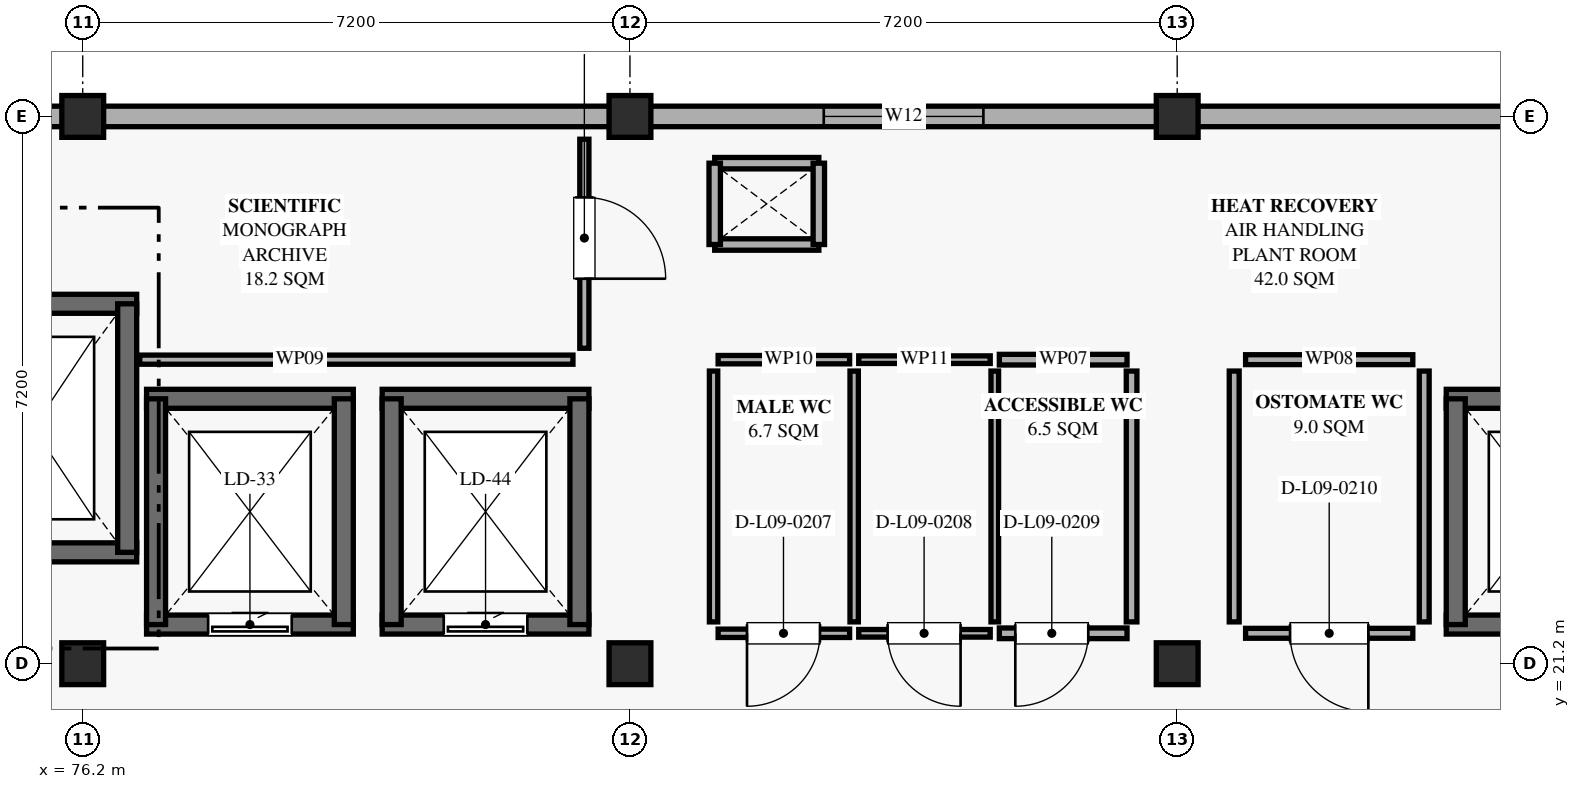
"""IFC4 building model, lengths in metres.
Left out: names, types, materials, properties, quantities, classifications, styles, units other than length and angle.
Written with IfcOpenShell. Run it as: python <this file> out.ifc"""

import sys

from ifc_helpers import new_model, si_unit, direction, frame, frame_2d, origin, origin_2d, place, context, subcontext, project, spatial, rectangle, extrude, element, fill, save


model = new_model("IFC4")
c1 = context("Model", 3, precision=1e-05, world=origin(), true_north=direction((0.0, 1.0)))
c2 = subcontext(c1, "Body", "Model", "MODEL_VIEW")
j1 = project(units=[si_unit("LENGTHUNIT", "METRE"), si_unit("PLANEANGLEUNIT", "RADIAN")], contexts=[c1])
p1 = place(None, origin())
s1 = spatial("IfcSite", under=j1, at=p1, CompositionType="ELEMENT")
p2 = place(p1, origin())
s2 = spatial("IfcBuilding", under=s1, at=p2, CompositionType="ELEMENT")
p3 = place(p2, frame((0.0, 0.0, 41.94)))
s3 = spatial("IfcBuildingStorey", under=s2, at=p3, CompositionType="ELEMENT", Elevation=41.94)
for number, where, z_axis, x_axis in (
    (1, (76.2, 21.2, 0.0), (0.0, 0.0, 1.0), (1.0, 0.0, 0.0)),
    (2, (83.4, 21.2, 0.0), (0.0, 0.0, 1.0), (1.0, 0.0, 0.0)),
    (3, (90.6, 21.2, 0.0), (0.0, 0.0, 1.0), (1.0, 0.0, 0.0)),
    (4, (76.2, 28.4, 0.0), (0.0, 0.0, 1.0), (1.0, 0.0, 0.0)),
    (5, (83.4, 28.4, 0.0), (0.0, 0.0, 1.0), (1.0, 0.0, 0.0)),
    (6, (90.6, 28.4, 0.0), (0.0, 0.0, 1.0), (1.0, 0.0, 0.0)),
):
    element("IfcColumn", number, at=place(p3, frame(where, z_axis=z_axis, x_axis=x_axis)), inside=s3, PredefinedType="COLUMN", context=c2, shape_type="SweptSolid", body=[
        extrude(rectangle(XDim=0.55, YDim=0.55, at=origin_2d()), origin(), (0.0, 0.0, 1.0), 4.32),
    ])
for number, where, z_axis, x_axis in (
    (7, (69.26, 28.4, 0.0), (0.0, 0.0, 1.0), (1.0, 0.0, 0.0)),
    (8, (76.46, 28.4, 0.0), (0.0, 0.0, 1.0), (1.0, 0.0, 0.0)),
):
    element("IfcWall", number, at=place(p3, frame(where, z_axis=z_axis, x_axis=x_axis)), inside=s3, PredefinedType="SOLIDWALL", context=c2, shape_type="SweptSolid", body=[
        extrude(rectangle(XDim=6.68, YDim=0.27, at=frame_2d((3.34, 0.0))), origin(), (0.0, 0.0, 1.0), 2.82),
    ])
p4 = place(p3, frame((83.66, 28.4, 0.0), z_axis=(0.0, 0.0, 1.0), x_axis=(1.0, 0.0, 0.0)))
e9 = element("IfcWall", 9, at=p4, inside=s3, PredefinedType="SOLIDWALL", context=c2, shape_type="SweptSolid", body=[
    extrude(rectangle(XDim=6.68, YDim=0.27, at=frame_2d((3.34, 0.0))), origin(), (0.0, 0.0, 1.0), 2.82),
])
p5 = place(p4, frame((2.29, 0.0, 0.85)))
e10 = element("IfcOpeningElement", 10, at=p5, cuts=e9, PredefinedType="OPENING", context=c2, shape_type="SweptSolid", body=[
    extrude(rectangle(XDim=2.1, YDim=1.8, at=frame_2d((1.05, 0.9))), frame((0.0, 0.145, 0.0), z_axis=(0.0, -1.0, 0.0), x_axis=(1.0, 0.0, 0.0)), (0.0, 0.0, 1.0), 0.29),
])
p6 = place(p3, frame((90.86, 28.4, 0.0), z_axis=(0.0, 0.0, 1.0), x_axis=(1.0, 0.0, 0.0)))
e11 = element("IfcWall", 11, at=p6, inside=s3, PredefinedType="SOLIDWALL", context=c2, shape_type="SweptSolid", body=[
    extrude(rectangle(XDim=6.68, YDim=0.27, at=frame_2d((3.34, 0.0))), origin(), (0.0, 0.0, 1.0), 2.82),
])
for number, where, z_axis, x_axis in (
    (12, (85.885, 26.715, 0.0), (0.0, 0.0, 1.0), (-1.0, 0.0, 0.0)),
    (13, (84.515, 27.785, 0.0), (0.0, 0.0, 1.0), (1.0, 0.0, 0.0)),
):
    element("IfcWall", number, at=place(p3, frame(where, z_axis=z_axis, x_axis=x_axis)), inside=s3, PredefinedType="PARTITIONING", context=c2, shape_type="SweptSolid", body=[
        extrude(rectangle(XDim=1.37, YDim=0.15, at=frame_2d((0.685, 0.0))), origin(), (0.0, 0.0, 1.0), 2.8),
    ])
for number, where, z_axis, x_axis in (
    (14, (84.515, 26.715, 0.0), (0.0, 0.0, 1.0), (0.0, 1.0, 0.0)),
    (15, (85.885, 27.785, 0.0), (0.0, 0.0, 1.0), (0.0, -1.0, 0.0)),
):
    element("IfcWall", number, at=place(p3, frame(where, z_axis=z_axis, x_axis=x_axis)), inside=s3, PredefinedType="PARTITIONING", context=c2, shape_type="SweptSolid", body=[
        extrude(rectangle(XDim=1.07, YDim=0.15, at=frame_2d((0.535, 0.0))), origin(), (0.0, 0.0, 1.0), 2.8),
    ])
for number, where, z_axis, x_axis in (
    (16, (76.91, 22.665, 0.0), (0.0, 0.0, 1.0), (-1.0, 0.0, 0.0)),
    (17, (74.19, 25.935, 0.0), (0.0, 0.0, 1.0), (1.0, 0.0, 0.0)),
):
    element("IfcWall", number, at=place(p3, frame(where, z_axis=z_axis, x_axis=x_axis)), inside=s3, PredefinedType="SHEAR", context=c2, shape_type="SweptSolid", body=[
        extrude(rectangle(XDim=2.72, YDim=0.25, at=frame_2d((1.36, 0.0))), origin(), (0.0, 0.0, 1.0), 4.07),
    ])
p7 = place(p3, frame((76.785, 25.935, 0.0), z_axis=(0.0, 0.0, 1.0), x_axis=(0.0, -1.0, 0.0)))
e18 = element("IfcWall", 18, at=p7, inside=s3, PredefinedType="SHEAR", context=c2, shape_type="SweptSolid", body=[
    extrude(rectangle(XDim=3.27, YDim=0.25, at=frame_2d((1.635, 0.0))), origin(), (0.0, 0.0, 1.0), 4.07),
])
p8 = place(p3, frame((79.76, 21.715, 0.0), z_axis=(0.0, 0.0, 1.0), x_axis=(-1.0, 0.0, 0.0)))
e19 = element("IfcWall", 19, at=p8, inside=s3, PredefinedType="SHEAR", context=c2, shape_type="SweptSolid", body=[
    extrude(rectangle(XDim=2.72, YDim=0.25, at=frame_2d((1.36, 0.0))), origin(), (0.0, 0.0, 1.0), 4.07),
])
p9 = place(p8, frame((0.81, 0.0, 0.0)))
e20 = element("IfcOpeningElement", 20, at=p9, cuts=e19, PredefinedType="OPENING", context=c2, shape_type="SweptSolid", body=[
    extrude(rectangle(XDim=1.1, YDim=2.2, at=frame_2d((0.55, 1.1))), frame((0.0, 0.135, 0.0), z_axis=(0.0, -1.0, 0.0), x_axis=(1.0, 0.0, 0.0)), (0.0, 0.0, 1.0), 0.27),
])
p10 = place(p3, frame((77.04, 24.685, 0.0), z_axis=(0.0, 0.0, 1.0), x_axis=(1.0, 0.0, 0.0)))
e21 = element("IfcWall", 21, at=p10, inside=s3, PredefinedType="SHEAR", context=c2, shape_type="SweptSolid", body=[
    extrude(rectangle(XDim=2.72, YDim=0.25, at=frame_2d((1.36, 0.0))), origin(), (0.0, 0.0, 1.0), 4.07),
])
for number, where, z_axis, x_axis in (
    (22, (77.165, 21.715, 0.0), (0.0, 0.0, 1.0), (0.0, 1.0, 0.0)),
    (23, (79.635, 24.685, 0.0), (0.0, 0.0, 1.0), (0.0, -1.0, 0.0)),
):
    element("IfcWall", number, at=place(p3, frame(where, z_axis=z_axis, x_axis=x_axis)), inside=s3, PredefinedType="SHEAR", context=c2, shape_type="SweptSolid", body=[
        extrude(rectangle(XDim=2.97, YDim=0.25, at=frame_2d((1.485, 0.0))), origin(), (0.0, 0.0, 1.0), 4.07),
    ])
p11 = place(p3, frame((82.86, 21.715, 0.0), z_axis=(0.0, 0.0, 1.0), x_axis=(-1.0, 0.0, 0.0)))
e24 = element("IfcWall", 24, at=p11, inside=s3, PredefinedType="SHEAR", context=c2, shape_type="SweptSolid", body=[
    extrude(rectangle(XDim=2.72, YDim=0.25, at=frame_2d((1.36, 0.0))), origin(), (0.0, 0.0, 1.0), 4.07),
])
p12 = place(p11, frame((0.81, 0.0, 0.0)))
e25 = element("IfcOpeningElement", 25, at=p12, cuts=e24, PredefinedType="OPENING", context=c2, shape_type="SweptSolid", body=[
    extrude(rectangle(XDim=1.1, YDim=2.2, at=frame_2d((0.55, 1.1))), frame((0.0, 0.135, 0.0), z_axis=(0.0, -1.0, 0.0), x_axis=(1.0, 0.0, 0.0)), (0.0, 0.0, 1.0), 0.27),
])
p13 = place(p3, frame((80.14, 24.685, 0.0), z_axis=(0.0, 0.0, 1.0), x_axis=(1.0, 0.0, 0.0)))
e26 = element("IfcWall", 26, at=p13, inside=s3, PredefinedType="SHEAR", context=c2, shape_type="SweptSolid", body=[
    extrude(rectangle(XDim=2.72, YDim=0.25, at=frame_2d((1.36, 0.0))), origin(), (0.0, 0.0, 1.0), 4.07),
])
for number, where, z_axis, x_axis in (
    (27, (80.265, 21.715, 0.0), (0.0, 0.0, 1.0), (0.0, 1.0, 0.0)),
    (28, (82.735, 24.685, 0.0), (0.0, 0.0, 1.0), (0.0, -1.0, 0.0)),
):
    element("IfcWall", number, at=place(p3, frame(where, z_axis=z_axis, x_axis=x_axis)), inside=s3, PredefinedType="SHEAR", context=c2, shape_type="SweptSolid", body=[
        extrude(rectangle(XDim=2.97, YDim=0.25, at=frame_2d((1.485, 0.0))), origin(), (0.0, 0.0, 1.0), 4.07),
    ])
p14 = place(p3, frame((96.86, 21.715, 0.0), z_axis=(0.0, 0.0, 1.0), x_axis=(-1.0, 0.0, 0.0)))
e29 = element("IfcWall", 29, at=p14, inside=s3, PredefinedType="SHEAR", context=c2, shape_type="SweptSolid", body=[
    extrude(rectangle(XDim=2.72, YDim=0.25, at=frame_2d((1.36, 0.0))), origin(), (0.0, 0.0, 1.0), 4.07),
])
p15 = place(p14, frame((0.81, 0.0, 0.0)))
e30 = element("IfcOpeningElement", 30, at=p15, cuts=e29, PredefinedType="OPENING", context=c2, shape_type="SweptSolid", body=[
    extrude(rectangle(XDim=1.1, YDim=2.2, at=frame_2d((0.55, 1.1))), frame((0.0, 0.135, 0.0), z_axis=(0.0, -1.0, 0.0), x_axis=(1.0, 0.0, 0.0)), (0.0, 0.0, 1.0), 0.27),
])
p16 = place(p3, frame((94.14, 24.685, 0.0), z_axis=(0.0, 0.0, 1.0), x_axis=(1.0, 0.0, 0.0)))
e31 = element("IfcWall", 31, at=p16, inside=s3, PredefinedType="SHEAR", context=c2, shape_type="SweptSolid", body=[
    extrude(rectangle(XDim=2.72, YDim=0.25, at=frame_2d((1.36, 0.0))), origin(), (0.0, 0.0, 1.0), 4.07),
])
p17 = place(p3, frame((94.265, 21.715, 0.0), z_axis=(0.0, 0.0, 1.0), x_axis=(0.0, 1.0, 0.0)))
e32 = element("IfcWall", 32, at=p17, inside=s3, PredefinedType="SHEAR", context=c2, shape_type="SweptSolid", body=[
    extrude(rectangle(XDim=2.97, YDim=0.25, at=frame_2d((1.485, 0.0))), origin(), (0.0, 0.0, 1.0), 4.07),
])
p18 = place(p3, frame((86.29, 21.6, 0.0), z_axis=(0.0, 0.0, 1.0), x_axis=(-1.0, 0.0, 0.0)))
e33 = element("IfcWall", 33, at=p18, inside=s3, PredefinedType="PARTITIONING", context=c2, shape_type="SweptSolid", body=[
    extrude(rectangle(XDim=1.73, YDim=0.11, at=frame_2d((0.865, 0.0))), origin(), (0.0, 0.0, 1.0), 2.8),
])
p19 = place(p18, frame((0.39, 0.0, 0.0)))
e34 = element("IfcOpeningElement", 34, at=p19, cuts=e33, PredefinedType="OPENING", context=c2, shape_type="SweptSolid", body=[
    extrude(rectangle(XDim=0.96, YDim=2.05, at=frame_2d((0.48, 1.025))), frame((0.0, 0.065, 0.0), z_axis=(0.0, -1.0, 0.0), x_axis=(1.0, 0.0, 0.0)), (0.0, 0.0, 1.0), 0.13),
])
p20 = place(p3, frame((84.56, 25.2, 0.0), z_axis=(0.0, 0.0, 1.0), x_axis=(1.0, 0.0, 0.0)))
e35 = element("IfcWall", 35, at=p20, inside=s3, PredefinedType="PARTITIONING", context=c2, shape_type="SweptSolid", body=[
    extrude(rectangle(XDim=1.73, YDim=0.11, at=frame_2d((0.865, 0.0))), origin(), (0.0, 0.0, 1.0), 2.8),
])
for number, where, z_axis, x_axis in (
    (36, (84.5, 21.75, 0.0), (0.0, 0.0, 1.0), (0.0, 1.0, 0.0)),
    (37, (86.35, 25.05, 0.0), (0.0, 0.0, 1.0), (0.0, -1.0, 0.0)),
):
    element("IfcWall", number, at=place(p3, frame(where, z_axis=z_axis, x_axis=x_axis)), inside=s3, PredefinedType="PARTITIONING", context=c2, shape_type="SweptSolid", body=[
        extrude(rectangle(XDim=3.3, YDim=0.11, at=frame_2d((1.65, 0.0))), origin(), (0.0, 0.0, 1.0), 2.8),
    ])
p21 = place(p3, frame((88.14, 21.6, 0.0), z_axis=(0.0, 0.0, 1.0), x_axis=(-1.0, 0.0, 0.0)))
e38 = element("IfcWall", 38, at=p21, inside=s3, PredefinedType="PARTITIONING", context=c2, shape_type="SweptSolid", body=[
    extrude(rectangle(XDim=1.73, YDim=0.1, at=frame_2d((0.865, 0.0))), origin(), (0.0, 0.0, 1.0), 2.8),
])
p22 = place(p21, frame((0.39, 0.0, 0.0)))
e39 = element("IfcOpeningElement", 39, at=p22, cuts=e38, PredefinedType="OPENING", context=c2, shape_type="SweptSolid", body=[
    extrude(rectangle(XDim=0.96, YDim=2.1, at=frame_2d((0.48, 1.05))), frame((0.0, 0.06, 0.0), z_axis=(0.0, -1.0, 0.0), x_axis=(1.0, 0.0, 0.0)), (0.0, 0.0, 1.0), 0.12),
])
p23 = place(p3, frame((86.41, 25.2, 0.0), z_axis=(0.0, 0.0, 1.0), x_axis=(1.0, 0.0, 0.0)))
e40 = element("IfcWall", 40, at=p23, inside=s3, PredefinedType="PARTITIONING", context=c2, shape_type="SweptSolid", body=[
    extrude(rectangle(XDim=1.73, YDim=0.1, at=frame_2d((0.865, 0.0))), origin(), (0.0, 0.0, 1.0), 2.8),
])
p24 = place(p3, frame((88.2, 25.05, 0.0), z_axis=(0.0, 0.0, 1.0), x_axis=(0.0, -1.0, 0.0)))
e41 = element("IfcWall", 41, at=p24, inside=s3, PredefinedType="PARTITIONING", context=c2, shape_type="SweptSolid", body=[
    extrude(rectangle(XDim=3.3, YDim=0.1, at=frame_2d((1.65, 0.0))), origin(), (0.0, 0.0, 1.0), 2.8),
])
p25 = place(p3, frame((89.94, 21.6, 0.0), z_axis=(0.0, 0.0, 1.0), x_axis=(-1.0, 0.0, 0.0)))
e42 = element("IfcWall", 42, at=p25, inside=s3, PredefinedType="PARTITIONING", context=c2, shape_type="SweptSolid", body=[
    extrude(rectangle(XDim=1.68, YDim=0.14, at=frame_2d((0.84, 0.0))), origin(), (0.0, 0.0, 1.0), 2.8),
])
p26 = place(p25, frame((0.51, 0.0, 0.0)))
e43 = element("IfcOpeningElement", 43, at=p26, cuts=e42, PredefinedType="OPENING", context=c2, shape_type="SweptSolid", body=[
    extrude(rectangle(XDim=0.96, YDim=2.16, at=frame_2d((0.48, 1.08))), frame((0.0, 0.08, 0.0), z_axis=(0.0, -1.0, 0.0), x_axis=(1.0, 0.0, 0.0)), (0.0, 0.0, 1.0), 0.16),
])
p27 = place(p3, frame((88.26, 25.2, 0.0), z_axis=(0.0, 0.0, 1.0), x_axis=(1.0, 0.0, 0.0)))
e44 = element("IfcWall", 44, at=p27, inside=s3, PredefinedType="PARTITIONING", context=c2, shape_type="SweptSolid", body=[
    extrude(rectangle(XDim=1.68, YDim=0.14, at=frame_2d((0.84, 0.0))), origin(), (0.0, 0.0, 1.0), 2.8),
])
p28 = place(p3, frame((90.0, 25.05, 0.0), z_axis=(0.0, 0.0, 1.0), x_axis=(0.0, -1.0, 0.0)))
e45 = element("IfcWall", 45, at=p28, inside=s3, PredefinedType="PARTITIONING", context=c2, shape_type="SweptSolid", body=[
    extrude(rectangle(XDim=3.3, YDim=0.14, at=frame_2d((1.65, 0.0))), origin(), (0.0, 0.0, 1.0), 2.8),
])
p29 = place(p3, frame((93.7, 21.6, 0.0), z_axis=(0.0, 0.0, 1.0), x_axis=(-1.0, 0.0, 0.0)))
e46 = element("IfcWall", 46, at=p29, inside=s3, PredefinedType="PARTITIONING", context=c2, shape_type="SweptSolid", body=[
    extrude(rectangle(XDim=2.2, YDim=0.13, at=frame_2d((1.1, 0.0))), origin(), (0.0, 0.0, 1.0), 2.8),
])
p30 = place(p29, frame((0.585, 0.0, 0.0)))
e47 = element("IfcOpeningElement", 47, at=p30, cuts=e46, PredefinedType="OPENING", context=c2, shape_type="SweptSolid", body=[
    extrude(rectangle(XDim=1.03, YDim=2.22, at=frame_2d((0.515, 1.11))), frame((0.0, 0.075, 0.0), z_axis=(0.0, -1.0, 0.0), x_axis=(1.0, 0.0, 0.0)), (0.0, 0.0, 1.0), 0.15),
])
p31 = place(p3, frame((91.5, 25.2, 0.0), z_axis=(0.0, 0.0, 1.0), x_axis=(1.0, 0.0, 0.0)))
e48 = element("IfcWall", 48, at=p31, inside=s3, PredefinedType="PARTITIONING", context=c2, shape_type="SweptSolid", body=[
    extrude(rectangle(XDim=2.2, YDim=0.13, at=frame_2d((1.1, 0.0))), origin(), (0.0, 0.0, 1.0), 2.8),
])
for number, where, z_axis, x_axis in (
    (49, (91.35, 21.75, 0.0), (0.0, 0.0, 1.0), (0.0, 1.0, 0.0)),
    (50, (93.85, 25.05, 0.0), (0.0, 0.0, 1.0), (0.0, -1.0, 0.0)),
):
    element("IfcWall", number, at=place(p3, frame(where, z_axis=z_axis, x_axis=x_axis)), inside=s3, PredefinedType="PARTITIONING", context=c2, shape_type="SweptSolid", body=[
        extrude(rectangle(XDim=3.3, YDim=0.13, at=frame_2d((1.65, 0.0))), origin(), (0.0, 0.0, 1.0), 2.8),
    ])
p32 = place(p3, frame((82.65, 25.2, 0.0), z_axis=(0.0, 0.0, 1.0), x_axis=(-1.0, 0.0, 0.0)))
e51 = element("IfcWall", 51, at=p32, inside=s3, PredefinedType="PARTITIONING", context=c2, shape_type="SweptSolid", body=[
    extrude(rectangle(XDim=5.7, YDim=0.12, at=frame_2d((2.85, 0.0))), origin(), (0.0, 0.0, 1.0), 2.8),
])
p33 = place(p3, frame((82.8, 28.1, 0.0), z_axis=(0.0, 0.0, 1.0), x_axis=(0.0, -1.0, 0.0)))
e52 = element("IfcWall", 52, at=p33, inside=s3, PredefinedType="PARTITIONING", context=c2, shape_type="SweptSolid", body=[
    extrude(rectangle(XDim=2.75, YDim=0.12, at=frame_2d((1.375, 0.0))), origin(), (0.0, 0.0, 1.0), 2.8),
])
p34 = place(p33, frame((0.765, 0.0, 0.0)))
e53 = element("IfcOpeningElement", 53, at=p34, cuts=e52, PredefinedType="OPENING", context=c2, shape_type="SweptSolid", body=[
    extrude(rectangle(XDim=1.07, YDim=2.16, at=frame_2d((0.535, 1.08))), frame((0.0, 0.07, 0.0), z_axis=(0.0, -1.0, 0.0), x_axis=(1.0, 0.0, 0.0)), (0.0, 0.0, 1.0), 0.14),
])
p35 = place(p5, origin())
e54 = element("IfcWindow", 54, at=p35, inside=s3, PartitioningType="DOUBLE_PANEL_VERTICAL", PredefinedType="WINDOW", context=c2, shape_type="SweptSolid", body=[
    extrude(rectangle(XDim=2.1, YDim=1.8, at=frame_2d((1.05, 0.9))), frame((0.0, 0.03, 0.0), z_axis=(0.0, -1.0, 0.0), x_axis=(1.0, 0.0, 0.0)), (0.0, 0.0, 1.0), 0.06),
])
fill(e10, e54)
p36 = place(p9, origin())
e55 = element("IfcDoor", 55, at=p36, inside=s3, OperationType="SLIDING_TO_LEFT", PredefinedType="DOOR", context=c2, shape_type="SweptSolid", body=[
    extrude(rectangle(XDim=1.1, YDim=2.2, at=frame_2d((0.55, 1.1))), frame((0.0, 0.025, 0.0), z_axis=(0.0, -1.0, 0.0), x_axis=(1.0, 0.0, 0.0)), (0.0, 0.0, 1.0), 0.05),
])
fill(e20, e55)
p37 = place(p12, origin())
e56 = element("IfcDoor", 56, at=p37, inside=s3, OperationType="SLIDING_TO_LEFT", PredefinedType="DOOR", context=c2, shape_type="SweptSolid", body=[
    extrude(rectangle(XDim=1.1, YDim=2.2, at=frame_2d((0.55, 1.1))), frame((0.0, 0.025, 0.0), z_axis=(0.0, -1.0, 0.0), x_axis=(1.0, 0.0, 0.0)), (0.0, 0.0, 1.0), 0.05),
])
fill(e25, e56)
p38 = place(p19, origin())
e57 = element("IfcDoor", 57, at=p38, inside=s3, OperationType="SINGLE_SWING_RIGHT", PredefinedType="DOOR", context=c2, shape_type="SweptSolid", body=[
    extrude(rectangle(XDim=0.96, YDim=2.05, at=frame_2d((0.48, 1.025))), frame((0.0, 0.025, 0.0), z_axis=(0.0, -1.0, 0.0), x_axis=(1.0, 0.0, 0.0)), (0.0, 0.0, 1.0), 0.05),
])
fill(e34, e57)
p39 = place(p22, origin())
e58 = element("IfcDoor", 58, at=p39, inside=s3, OperationType="SINGLE_SWING_LEFT", PredefinedType="DOOR", context=c2, shape_type="SweptSolid", body=[
    extrude(rectangle(XDim=0.96, YDim=2.1, at=frame_2d((0.48, 1.05))), frame((0.0, 0.025, 0.0), z_axis=(0.0, -1.0, 0.0), x_axis=(1.0, 0.0, 0.0)), (0.0, 0.0, 1.0), 0.05),
])
fill(e39, e58)
p40 = place(p26, origin())
e59 = element("IfcDoor", 59, at=p40, inside=s3, OperationType="SINGLE_SWING_RIGHT", PredefinedType="DOOR", context=c2, shape_type="SweptSolid", body=[
    extrude(rectangle(XDim=0.96, YDim=2.16, at=frame_2d((0.48, 1.08))), frame((0.0, 0.025, 0.0), z_axis=(0.0, -1.0, 0.0), x_axis=(1.0, 0.0, 0.0)), (0.0, 0.0, 1.0), 0.05),
])
fill(e43, e59)
p41 = place(p30, origin())
e60 = element("IfcDoor", 60, at=p41, inside=s3, OperationType="SINGLE_SWING_LEFT", PredefinedType="DOOR", context=c2, shape_type="SweptSolid", body=[
    extrude(rectangle(XDim=1.03, YDim=2.22, at=frame_2d((0.515, 1.11))), frame((0.0, 0.025, 0.0), z_axis=(0.0, -1.0, 0.0), x_axis=(1.0, 0.0, 0.0)), (0.0, 0.0, 1.0), 0.05),
])
fill(e47, e60)
p42 = place(p34, origin())
e61 = element("IfcDoor", 61, at=p42, inside=s3, OperationType="SINGLE_SWING_RIGHT", PredefinedType="DOOR", context=c2, shape_type="SweptSolid", body=[
    extrude(rectangle(XDim=1.07, YDim=2.16, at=frame_2d((0.535, 1.08))), frame((0.0, 0.025, 0.0), z_axis=(0.0, -1.0, 0.0), x_axis=(1.0, 0.0, 0.0)), (0.0, 0.0, 1.0), 0.05),
])
fill(e53, e61)
save(model, sys.argv[1])
